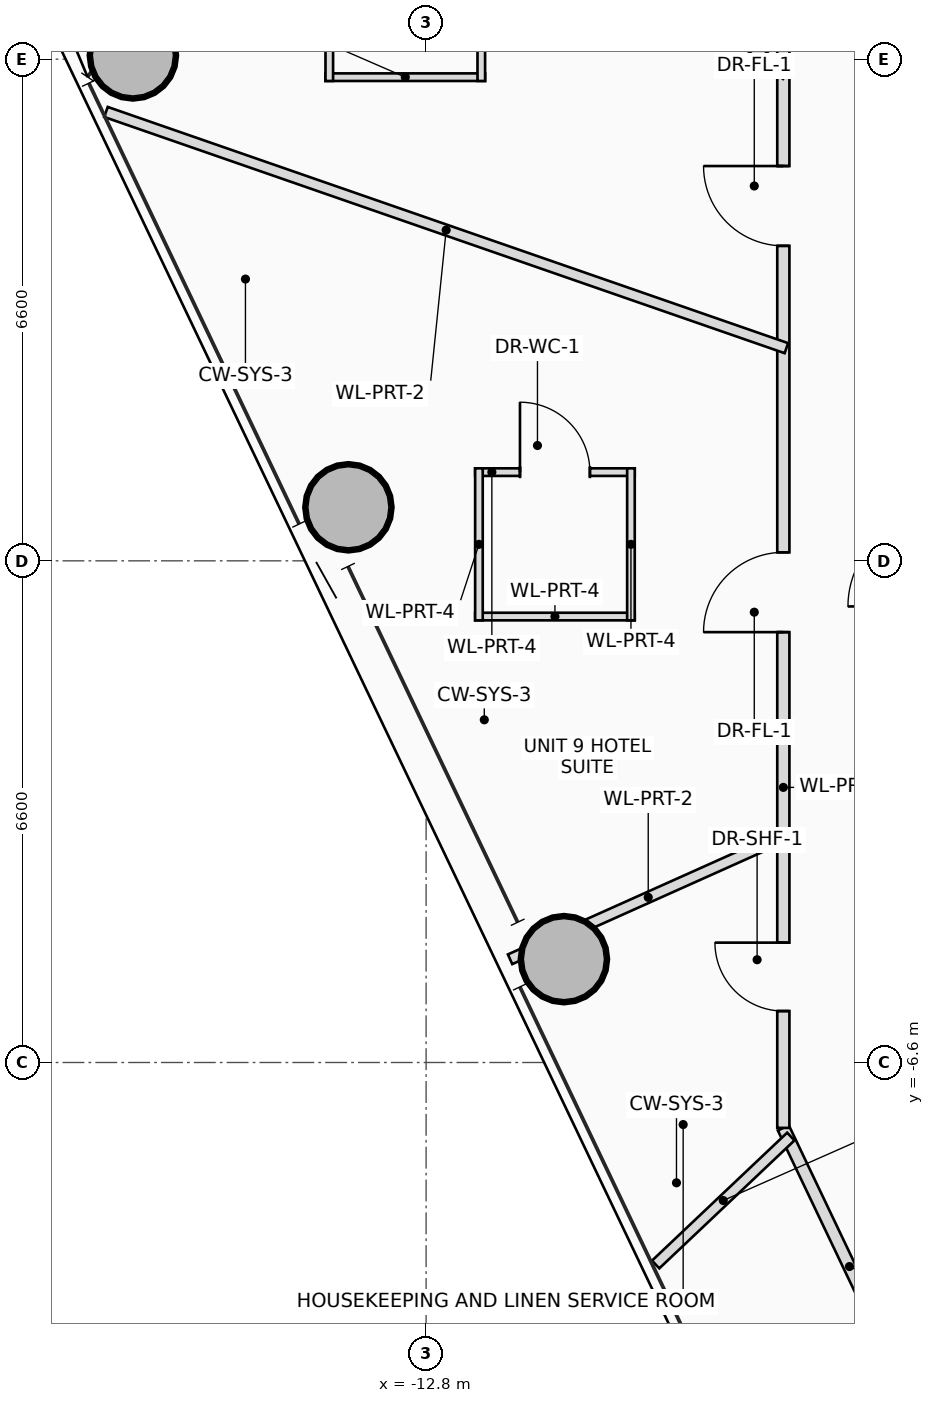
"""IFC4 building model, lengths in metres.
Left out: names, types, materials, properties, quantities, classifications, styles, units other than length and angle.
Written with IfcOpenShell. Run it as: python <this file> out.ifc"""

import sys

from ifc_helpers import new_model, si_unit, direction, frame, frame_2d, origin, origin_2d, place, context, subcontext, project, spatial, rectangle, hollow_circle, extrude, source, transform, mapped, element, fill, save


model = new_model("IFC4")
c1 = context("Model", 3, precision=1e-05, world=origin(), true_north=direction((0.0, 1.0)))
c2 = subcontext(c1, "Body", "Model", "MODEL_VIEW")
j1 = project(units=[si_unit("LENGTHUNIT", "METRE"), si_unit("PLANEANGLEUNIT", "RADIAN")], contexts=[c1])
p1 = place(None, origin())
s1 = spatial("IfcSite", under=j1, at=p1, CompositionType="ELEMENT")
p2 = place(p1, origin())
s2 = spatial("IfcBuilding", under=s1, at=p2, CompositionType="ELEMENT")
p3 = place(p2, frame((0.0, 0.0, 205.25)))
s3 = spatial("IfcBuildingStorey", under=s2, at=p3, CompositionType="ELEMENT", Elevation=205.25)
m1 = source(origin(), c2, "Body", "SweptSolid", [
    extrude(hollow_circle(Radius=0.575, WallThickness=0.042, at=origin_2d()), origin(), (0.0, 0.0, 1.0), 3.45),
])
for number, where, z_axis, x_axis in (
    (1, (-16.658, 6.649, 0.0), (0.0, 0.0, 1.0), (1.0, 0.0, 0.0)),
    (2, (-13.823, 0.704, 0.0), (0.0, 0.0, 1.0), (1.0, 0.0, 0.0)),
    (3, (-10.987, -5.24, 0.0), (0.0, 0.0, 1.0), (1.0, 0.0, 0.0)),
):
    element("IfcColumn", number, at=place(p3, frame(where, z_axis=z_axis, x_axis=x_axis)), inside=s3, PredefinedType="COLUMN", context=c2, shape_type="MappedRepresentation", body=[
        mapped(m1, transform((0.0, 0.0, 0.0), scale=1.0)),
    ])
p4 = place(p3, frame((-12.024, 6.363, 0.0), z_axis=(0.0, 0.0, 1.0), x_axis=(-1.0, 0.0, 0.0)))
e4 = element("IfcWall", 4, at=p4, inside=s3, PredefinedType="PARTITIONING", context=c2, shape_type="SweptSolid", body=[
    extrude(rectangle(XDim=2.1, YDim=0.1, at=frame_2d((1.05, 0.0))), origin(), (0.0, 0.0, 1.0), 2.605),
])
p5 = place(p3, frame((-12.074, 8.313, 0.0), z_axis=(0.0, 0.0, 1.0), x_axis=(0.0, -1.0, 0.0)))
e5 = element("IfcWall", 5, at=p5, inside=s3, PredefinedType="PARTITIONING", context=c2, shape_type="SweptSolid", body=[
    extrude(rectangle(XDim=2.0, YDim=0.1, at=frame_2d((1.0, 0.0))), origin(), (0.0, 0.0, 1.0), 2.905),
])
p6 = place(p3, frame((-14.074, 6.313, 0.0), z_axis=(0.0, 0.0, 1.0), x_axis=(0.0, 1.0, 0.0)))
e6 = element("IfcWall", 6, at=p6, inside=s3, PredefinedType="PARTITIONING", context=c2, shape_type="SweptSolid", body=[
    extrude(rectangle(XDim=2.0, YDim=0.1, at=frame_2d((1.0, 0.0))), origin(), (0.0, 0.0, 1.0), 2.605),
])
p7 = place(p3, frame((-12.155, 1.167, 0.0), z_axis=(0.0, 0.0, 1.0), x_axis=(1.0, 0.0, 0.0)))
e7 = element("IfcWall", 7, at=p7, inside=s3, PredefinedType="PARTITIONING", context=c2, shape_type="SweptSolid", body=[
    extrude(rectangle(XDim=2.1, YDim=0.1, at=frame_2d((1.05, 0.0))), origin(), (0.0, 0.0, 1.0), 2.905),
])
p8 = place(p7, frame((0.59, 0.0, 0.0)))
e8 = element("IfcOpeningElement", 8, at=p8, cuts=e7, PredefinedType="OPENING", context=c2, shape_type="SweptSolid", body=[
    extrude(rectangle(XDim=0.92, YDim=2.1, at=frame_2d((0.46, 1.05))), frame((0.0, 0.06, 0.0), z_axis=(0.0, -1.0, 0.0), x_axis=(1.0, 0.0, 0.0)), (0.0, 0.0, 1.0), 0.12),
])
p9 = place(p3, frame((-10.055, -0.733, 0.0), z_axis=(0.0, 0.0, 1.0), x_axis=(-1.0, 0.0, 0.0)))
e9 = element("IfcWall", 9, at=p9, inside=s3, PredefinedType="PARTITIONING", context=c2, shape_type="SweptSolid", body=[
    extrude(rectangle(XDim=2.1, YDim=0.1, at=frame_2d((1.05, 0.0))), origin(), (0.0, 0.0, 1.0), 2.905),
])
for number, where, z_axis, x_axis in (
    (10, (-10.105, 1.217, 0.0), (0.0, 0.0, 1.0), (0.0, -1.0, 0.0)),
    (11, (-12.105, -0.783, 0.0), (0.0, 0.0, 1.0), (0.0, 1.0, 0.0)),
):
    element("IfcWall", number, at=place(p3, frame(where, z_axis=z_axis, x_axis=x_axis)), inside=s3, PredefinedType="PARTITIONING", context=c2, shape_type="SweptSolid", body=[
        extrude(rectangle(XDim=2.0, YDim=0.1, at=frame_2d((1.0, 0.0))), origin(), (0.0, 0.0, 1.0), 3.25),
    ])
p10 = place(p3, frame((-6.36, -11.108, 0.0), z_axis=(0.0, 0.0, 1.0), x_axis=(-0.430489180359, 0.902595737633, 0.0)))
e12 = element("IfcWall", 12, at=p10, inside=s3, PredefinedType="PARTITIONING", context=c2, shape_type="SweptSolid", body=[
    extrude(rectangle(XDim=4.042, YDim=0.16, at=frame_2d((2.021, 0.0))), origin(), (0.0, 0.0, 1.0), 2.605),
])
p11 = place(p3, frame((-8.1, -7.46, 0.0), z_axis=(0.0, 0.0, 1.0), x_axis=(0.0, 1.0, 0.0)))
e13 = element("IfcWall", 13, at=p11, inside=s3, PredefinedType="PARTITIONING", context=c2, shape_type="SweptSolid", body=[
    extrude(rectangle(XDim=15.01, YDim=0.16, at=frame_2d((7.505, 0.0))), origin(), (0.0, 0.0, 1.0), 2.605),
])
p12 = place(p11, frame((1.537, 0.0, 0.0)))
e14 = element("IfcOpeningElement", 14, at=p12, cuts=e13, PredefinedType="OPENING", context=c2, shape_type="SweptSolid", body=[
    extrude(rectangle(XDim=0.9, YDim=2.05, at=frame_2d((0.45, 1.025))), frame((0.0, 0.09, 0.0), z_axis=(0.0, -1.0, 0.0), x_axis=(1.0, 0.0, 0.0)), (0.0, 0.0, 1.0), 0.18),
])
p13 = place(p11, frame((6.522, 0.0, 0.0)))
e15 = element("IfcOpeningElement", 15, at=p13, cuts=e13, PredefinedType="OPENING", context=c2, shape_type="SweptSolid", body=[
    extrude(rectangle(XDim=1.05, YDim=2.2, at=frame_2d((0.525, 1.1))), frame((0.0, 0.09, 0.0), z_axis=(0.0, -1.0, 0.0), x_axis=(1.0, 0.0, 0.0)), (0.0, 0.0, 1.0), 0.18),
])
p14 = place(p11, frame((11.604, 0.0, 0.0)))
e16 = element("IfcOpeningElement", 16, at=p14, cuts=e13, PredefinedType="OPENING", context=c2, shape_type="SweptSolid", body=[
    extrude(rectangle(XDim=1.05, YDim=2.2, at=frame_2d((0.525, 1.1))), frame((0.0, 0.09, 0.0), z_axis=(0.0, -1.0, 0.0), x_axis=(1.0, 0.0, 0.0)), (0.0, 0.0, 1.0), 0.18),
])
p15 = place(p3, frame((-8.06, 6.395, 0.0), z_axis=(0.0, 0.0, 1.0), x_axis=(-0.783385602556, 0.621535998723, 0.0)))
e17 = element("IfcWall", 17, at=p15, inside=s3, PredefinedType="PARTITIONING", context=c2, shape_type="SweptSolid", body=[
    extrude(rectangle(XDim=8.449, YDim=0.14, at=frame_2d((4.224, 0.0))), origin(), (0.0, 0.0, 1.0), 2.605),
])
p16 = place(p3, frame((-8.06, 2.798, 0.0), z_axis=(0.0, 0.0, 1.0), x_axis=(-0.944705149401, 0.327920997643, 0.0)))
e18 = element("IfcWall", 18, at=p16, inside=s3, PredefinedType="PARTITIONING", context=c2, shape_type="SweptSolid", body=[
    extrude(rectangle(XDim=9.476, YDim=0.14, at=frame_2d((4.738, 0.0))), origin(), (0.0, 0.0, 1.0), 2.605),
])
p17 = place(p3, frame((-8.06, -3.613, 0.0), z_axis=(0.0, 0.0, 1.0), x_axis=(-0.91252825503, -0.409013671865, 0.0)))
e19 = element("IfcWall", 19, at=p17, inside=s3, PredefinedType="PARTITIONING", context=c2, shape_type="SweptSolid", body=[
    extrude(rectangle(XDim=3.984, YDim=0.14, at=frame_2d((1.992, 0.0))), origin(), (0.0, 0.0, 1.0), 2.805),
])
p18 = place(p3, frame((-8.001, -7.574, 0.0), z_axis=(0.0, 0.0, 1.0), x_axis=(-0.726232954986, -0.687448685424, 0.0)))
e20 = element("IfcWall", 20, at=p18, inside=s3, PredefinedType="PARTITIONING", context=c2, shape_type="SweptSolid", body=[
    extrude(rectangle(XDim=2.449, YDim=0.14, at=frame_2d((1.224, 0.0))), origin(), (0.0, 0.0, 1.0), 2.765),
])
p19 = place(p8, origin())
e21 = element("IfcDoor", 21, at=p19, inside=s3, OperationType="SINGLE_SWING_LEFT", PredefinedType="DOOR", context=c2, shape_type="SweptSolid", body=[
    extrude(rectangle(XDim=0.92, YDim=2.1, at=frame_2d((0.46, 1.05))), frame((0.0, 0.025, 0.0), z_axis=(0.0, -1.0, 0.0), x_axis=(1.0, 0.0, 0.0)), (0.0, 0.0, 1.0), 0.05),
])
fill(e8, e21)
p20 = place(p12, origin())
e22 = element("IfcDoor", 22, at=p20, inside=s3, OperationType="SINGLE_SWING_RIGHT", PredefinedType="DOOR", context=c2, shape_type="SweptSolid", body=[
    extrude(rectangle(XDim=0.9, YDim=2.05, at=frame_2d((0.45, 1.025))), frame((0.0, 0.025, 0.0), z_axis=(0.0, -1.0, 0.0), x_axis=(1.0, 0.0, 0.0)), (0.0, 0.0, 1.0), 0.05),
])
fill(e14, e22)
p21 = place(p13, origin())
e23 = element("IfcDoor", 23, at=p21, inside=s3, OperationType="SINGLE_SWING_LEFT", PredefinedType="DOOR", context=c2, shape_type="SweptSolid", body=[
    extrude(rectangle(XDim=1.05, YDim=2.2, at=frame_2d((0.525, 1.1))), frame((0.0, 0.025, 0.0), z_axis=(0.0, -1.0, 0.0), x_axis=(1.0, 0.0, 0.0)), (0.0, 0.0, 1.0), 0.05),
])
fill(e15, e23)
p22 = place(p14, origin())
e24 = element("IfcDoor", 24, at=p22, inside=s3, OperationType="SINGLE_SWING_RIGHT", PredefinedType="DOOR", context=c2, shape_type="SweptSolid", body=[
    extrude(rectangle(XDim=1.05, YDim=2.2, at=frame_2d((0.525, 1.1))), frame((0.0, 0.025, 0.0), z_axis=(0.0, -1.0, 0.0), x_axis=(1.0, 0.0, 0.0)), (0.0, 0.0, 1.0), 0.05),
])
fill(e16, e24)
save(model, sys.argv[1])
